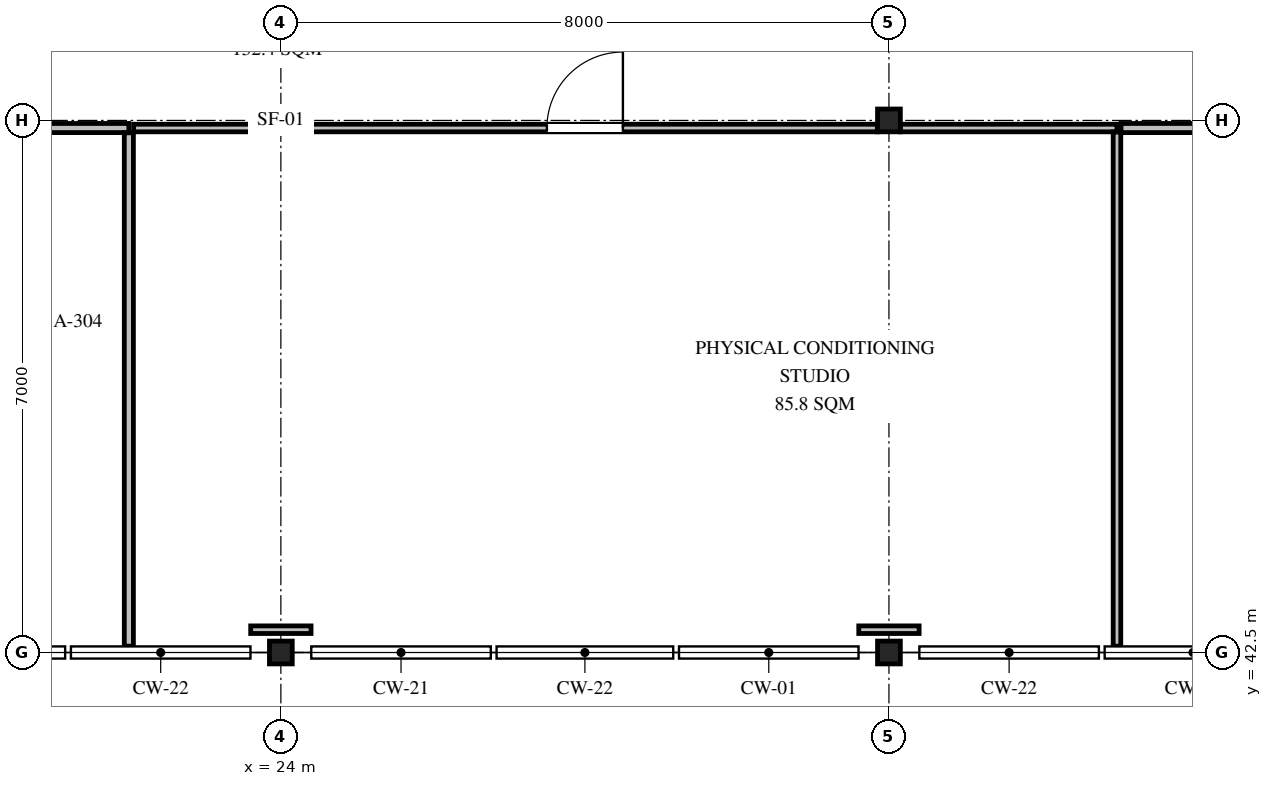
"""IFC4 building model, lengths in metres.
Left out: names, types, materials, properties, quantities, classifications, styles, units other than length and angle.
Written with IfcOpenShell. Run it as: python <this file> out.ifc"""

import sys

from ifc_helpers import new_model, si_unit, direction, frame, frame_2d, origin, origin_2d, place, context, subcontext, project, spatial, rectangle, i_section, extrude, element, fill, save


model = new_model("IFC4")
c1 = context("Model", 3, precision=1e-05, world=origin(), true_north=direction((0.0, 1.0)))
c2 = subcontext(c1, "Body", "Model", "MODEL_VIEW")
j1 = project(units=[si_unit("LENGTHUNIT", "METRE"), si_unit("PLANEANGLEUNIT", "RADIAN")], contexts=[c1])
p1 = place(None, origin())
s1 = spatial("IfcSite", under=j1, at=p1, CompositionType="ELEMENT")
p2 = place(p1, origin())
s2 = spatial("IfcBuilding", under=s1, at=p2, CompositionType="ELEMENT")
p3 = place(p2, frame((0.0, 0.0, 10.05)))
s3 = spatial("IfcBuildingStorey", under=s2, at=p3, CompositionType="ELEMENT", Elevation=10.05)
for number, where, z_axis, x_axis in (
    (1, (24.0, 42.5, 0.0), (0.0, 0.0, 1.0), (1.0, 0.0, 0.0)),
    (2, (24.0, 49.5, 0.0), (0.0, 0.0, 1.0), (1.0, 0.0, 0.0)),
    (3, (32.0, 42.5, 0.0), (0.0, 0.0, 1.0), (1.0, 0.0, 0.0)),
    (4, (32.0, 49.5, 0.0), (0.0, 0.0, 1.0), (1.0, 0.0, 0.0)),
):
    element("IfcColumn", number, at=place(p3, frame(where, z_axis=z_axis, x_axis=x_axis)), inside=s3, PredefinedType="COLUMN", context=c2, shape_type="SweptSolid", body=[
        extrude(i_section(OverallWidth=0.3, OverallDepth=0.3, WebThickness=0.01, FlangeThickness=0.015, FilletRadius=0.018, at=origin_2d()), origin(), (0.0, 0.0, 1.0), 4.2),
    ])
p4 = place(p3, frame((16.153, 49.4, 0.0), z_axis=(0.0, 0.0, 1.0), x_axis=(1.0, 0.0, 0.0)))
e5 = element("IfcWall", 5, at=p4, inside=s3, PredefinedType="PARTITIONING", context=c2, shape_type="SweptSolid", body=[
    extrude(rectangle(XDim=5.847, YDim=0.12, at=frame_2d((2.923, 0.0))), origin(), (0.0, 0.0, 1.0), 3.386),
])
p5 = place(p3, frame((22.0, 42.583, 0.0), z_axis=(0.0, 0.0, 1.0), x_axis=(0.0, 1.0, 0.0)))
e6 = element("IfcWall", 6, at=p5, inside=s3, PredefinedType="PARTITIONING", context=c2, shape_type="SweptSolid", body=[
    extrude(rectangle(XDim=6.754, YDim=0.12, at=frame_2d((3.377, 0.0))), origin(), (0.0, 0.0, 1.0), 3.98),
])
for number, where, z_axis, x_axis in (
    (7, (23.603, 42.8, 0.0), (0.0, 0.0, 1.0), (1.0, 0.0, 0.0)),
    (8, (31.603, 42.8, 0.0), (0.0, 0.0, 1.0), (1.0, 0.0, 0.0)),
):
    element("IfcWall", number, at=place(p3, frame(where, z_axis=z_axis, x_axis=x_axis)), inside=s3, PredefinedType="PARTITIONING", context=c2, shape_type="SweptSolid", body=[
        extrude(rectangle(XDim=0.794, YDim=0.1, at=frame_2d((0.397, 0.0))), origin(), (0.0, 0.0, 1.0), 3.98),
    ])
p6 = place(p3, frame((22.063, 49.4, 0.0), z_axis=(0.0, 0.0, 1.0), x_axis=(1.0, 0.0, 0.0)))
e9 = element("IfcWall", 9, at=p6, inside=s3, PredefinedType="PARTITIONING", context=c2, shape_type="SweptSolid", body=[
    extrude(rectangle(XDim=1.784, YDim=0.1, at=frame_2d((0.892, 0.0))), origin(), (0.0, 0.0, 1.0), 3.386),
])
p7 = place(p3, frame((24.153, 49.4, 0.0), z_axis=(0.0, 0.0, 1.0), x_axis=(1.0, 0.0, 0.0)))
e10 = element("IfcWall", 10, at=p7, inside=s3, PredefinedType="PARTITIONING", context=c2, shape_type="SweptSolid", body=[
    extrude(rectangle(XDim=7.694, YDim=0.1, at=frame_2d((3.847, 0.0))), origin(), (0.0, 0.0, 1.0), 3.324),
])
p8 = place(p7, frame((3.347, 0.0, 0.0)))
e11 = element("IfcOpeningElement", 11, at=p8, cuts=e10, PredefinedType="OPENING", context=c2, shape_type="SweptSolid", body=[
    extrude(rectangle(XDim=1.0, YDim=2.1, at=frame_2d((0.5, 1.05))), frame((0.0, 0.06, 0.0), z_axis=(0.0, -1.0, 0.0), x_axis=(1.0, 0.0, 0.0)), (0.0, 0.0, 1.0), 0.12),
])
p9 = place(p3, frame((32.153, 49.4, 0.0), z_axis=(0.0, 0.0, 1.0), x_axis=(1.0, 0.0, 0.0)))
e12 = element("IfcWall", 12, at=p9, inside=s3, PredefinedType="PARTITIONING", context=c2, shape_type="SweptSolid", body=[
    extrude(rectangle(XDim=2.847, YDim=0.1, at=frame_2d((1.423, 0.0))), origin(), (0.0, 0.0, 1.0), 3.374),
])
p10 = place(p3, frame((35.0, 42.583, 0.0), z_axis=(0.0, 0.0, 1.0), x_axis=(0.0, 1.0, 0.0)))
e13 = element("IfcWall", 13, at=p10, inside=s3, PredefinedType="PARTITIONING", context=c2, shape_type="SweptSolid", body=[
    extrude(rectangle(XDim=6.764, YDim=0.1, at=frame_2d((3.382, 0.0))), origin(), (0.0, 0.0, 1.0), 3.98),
])
p11 = place(p3, frame((35.053, 49.4, 0.0), z_axis=(0.0, 0.0, 1.0), x_axis=(1.0, 0.0, 0.0)))
e14 = element("IfcWall", 14, at=p11, inside=s3, PredefinedType="PARTITIONING", context=c2, shape_type="SweptSolid", body=[
    extrude(rectangle(XDim=4.794, YDim=0.12, at=frame_2d((2.397, 0.0))), origin(), (0.0, 0.0, 1.0), 3.374),
])
p12 = place(p8, origin())
e15 = element("IfcDoor", 15, at=p12, inside=s3, OperationType="SINGLE_SWING_RIGHT", PredefinedType="DOOR", context=c2, shape_type="SweptSolid", body=[
    extrude(rectangle(XDim=1.0, YDim=2.1, at=frame_2d((0.5, 1.05))), frame((0.0, 0.025, 0.0), z_axis=(0.0, -1.0, 0.0), x_axis=(1.0, 0.0, 0.0)), (0.0, 0.0, 1.0), 0.05),
])
fill(e11, e15)
save(model, sys.argv[1])
